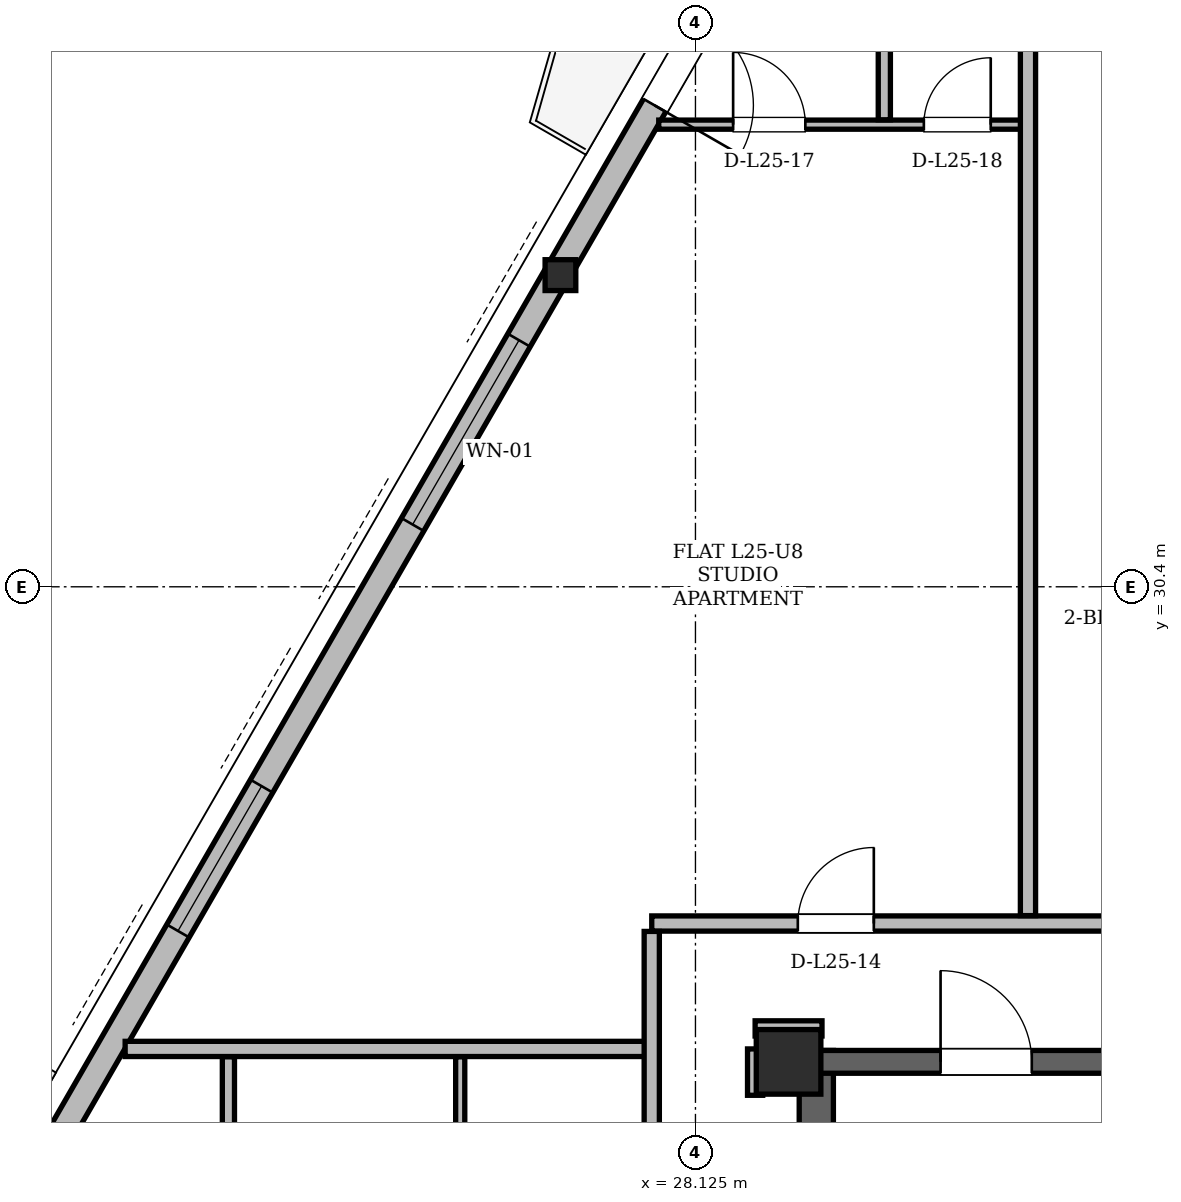
"""IFC4 building model, lengths in metres.
Left out: names, types, materials, properties, quantities, classifications, styles, units other than length and angle.
Written with IfcOpenShell. Run it as: python <this file> out.ifc"""

import sys

from ifc_helpers import new_model, si_unit, direction, frame, frame_2d, origin, origin_2d, place, context, subcontext, project, spatial, rectangle, hollow_rectangle, i_section, extrude, element, fill, save


model = new_model("IFC4")
c1 = context("Model", 3, precision=1e-05, world=origin(), true_north=direction((0.0, 1.0)))
c2 = subcontext(c1, "Body", "Model", "MODEL_VIEW")
j1 = project(units=[si_unit("LENGTHUNIT", "METRE"), si_unit("PLANEANGLEUNIT", "RADIAN")], contexts=[c1])
p1 = place(None, origin())
s1 = spatial("IfcSite", under=j1, at=p1, CompositionType="ELEMENT")
p2 = place(p1, origin())
s2 = spatial("IfcBuilding", under=s1, at=p2, CompositionType="ELEMENT")
p3 = place(p2, frame((0.0, 0.0, 96.9)))
s3 = spatial("IfcBuildingStorey", under=s2, at=p3, CompositionType="ELEMENT", Elevation=96.9)
p4 = place(p3, frame((29.35, 24.15, 0.0), z_axis=(0.0, 0.0, 1.0), x_axis=(1.0, 0.0, 0.0)))
e1 = element("IfcColumn", 1, at=p4, inside=s3, PredefinedType="COLUMN", context=c2, shape_type="SweptSolid", body=[
    extrude(hollow_rectangle(XDim=0.85, YDim=0.85, WallThickness=0.07, at=origin_2d()), origin(), (0.0, 0.0, 1.0), 3.6),
])
p5 = place(p3, frame((26.307, 34.515, 0.005), z_axis=(0.023379831777, -0.008359649153, 0.999691702342), x_axis=(0.336683176567, 0.941617989748, 0.0)))
e2 = element("IfcColumn", 2, at=p5, inside=s3, PredefinedType="COLUMN", context=c2, shape_type="SweptSolid", body=[
    extrude(i_section(OverallWidth=0.404, OverallDepth=0.406, WebThickness=0.027, FlangeThickness=0.044, at=origin_2d()), origin(), (0.0, 0.0, 1.0), 3.592),
])
p6 = place(p3, frame((29.715, 11.0, 0.0), z_axis=(0.0, 0.0, 1.0), x_axis=(0.0, 1.0, 0.0)))
e3 = element("IfcWall", 3, at=p6, inside=s3, PredefinedType="SHEAR", context=c2, shape_type="SweptSolid", body=[
    extrude(rectangle(XDim=13.3, YDim=0.45, at=frame_2d((6.65, 0.0))), origin(), (0.0, 0.0, 1.0), 3.36),
])
p7 = place(p3, frame((29.65, 24.15, 0.0), z_axis=(0.0, 0.0, 1.0), x_axis=(1.0, 0.0, 0.0)))
e4 = element("IfcWall", 4, at=p7, inside=s3, PredefinedType="SHEAR", context=c2, shape_type="SweptSolid", body=[
    extrude(rectangle(XDim=15.7, YDim=0.3, at=frame_2d((7.85, 0.0))), origin(), (0.0, 0.0, 1.0), 3.36),
])
p8 = place(p7, frame((1.7, 0.0, 0.0)))
e5 = element("IfcOpeningElement", 5, at=p8, cuts=e4, PredefinedType="OPENING", context=c2, shape_type="SweptSolid", body=[
    extrude(rectangle(XDim=1.2, YDim=2.2, at=frame_2d((0.6, 1.1))), frame((0.0, 0.15, 0.0), z_axis=(0.0, -1.0, 0.0), x_axis=(1.0, 0.0, 0.0)), (0.0, 0.0, 1.0), 0.3),
])
p9 = place(p7, frame((12.8, 0.0, 0.0)))
e6 = element("IfcOpeningElement", 6, at=p9, cuts=e4, PredefinedType="OPENING", context=c2, shape_type="SweptSolid", body=[
    extrude(rectangle(XDim=1.2, YDim=2.2, at=frame_2d((0.6, 1.1))), frame((0.0, 0.15, 0.0), z_axis=(0.0, -1.0, 0.0), x_axis=(1.0, 0.0, 0.0)), (0.0, 0.0, 1.0), 0.3),
])
p10 = place(p7, frame((6.55, 0.0, 0.0)))
e7 = element("IfcOpeningElement", 7, at=p10, cuts=e4, PredefinedType="OPENING", context=c2, shape_type="SweptSolid", body=[
    extrude(rectangle(XDim=0.9, YDim=2.05, at=frame_2d((0.45, 1.025))), frame((0.0, 0.15, 0.0), z_axis=(0.0, -1.0, 0.0), x_axis=(1.0, 0.0, 0.0)), (0.0, 0.0, 1.0), 0.3),
])
p11 = place(p7, frame((8.45, 0.0, 0.0)))
e8 = element("IfcOpeningElement", 8, at=p11, cuts=e4, PredefinedType="OPENING", context=c2, shape_type="SweptSolid", body=[
    extrude(rectangle(XDim=0.9, YDim=2.05, at=frame_2d((0.45, 1.025))), frame((0.0, 0.15, 0.0), z_axis=(0.0, -1.0, 0.0), x_axis=(1.0, 0.0, 0.0)), (0.0, 0.0, 1.0), 0.3),
])
p12 = place(p3, frame((31.472, 43.462, 0.0), z_axis=(0.0, 0.0, 1.0), x_axis=(-0.499995749028, -0.86602785807, 0.0)))
e9 = element("IfcWall", 9, at=p12, inside=s3, PredefinedType="SOLIDWALL", context=c2, shape_type="SweptSolid", body=[
    extrude(rectangle(XDim=34.437, YDim=0.34, at=frame_2d((17.218, 0.0))), origin(), (0.0, 0.0, 1.0), 2.578),
])
p13 = place(p12, frame((6.469, 0.0, 0.0)))
e10 = element("IfcOpeningElement", 10, at=p13, cuts=e9, PredefinedType="OPENING", context=c2, shape_type="SweptSolid", body=[
    extrude(rectangle(XDim=1.3, YDim=2.2, at=frame_2d((0.65, 1.1))), frame((0.0, 0.17, 0.0), z_axis=(0.0, -1.0, 0.0), x_axis=(1.0, 0.0, 0.0)), (0.0, 0.0, 1.0), 0.34),
])
p14 = place(p12, frame((24.902, 0.0, 0.0)))
e11 = element("IfcOpeningElement", 11, at=p14, cuts=e9, PredefinedType="OPENING", context=c2, shape_type="SweptSolid", body=[
    extrude(rectangle(XDim=1.5, YDim=2.2, at=frame_2d((0.75, 1.1))), frame((0.0, 0.17, 0.0), z_axis=(0.0, -1.0, 0.0), x_axis=(1.0, 0.0, 0.0)), (0.0, 0.0, 1.0), 0.34),
])
p15 = place(p12, frame((30.75, 0.0, 0.85)))
e12 = element("IfcOpeningElement", 12, at=p15, cuts=e9, PredefinedType="OPENING", context=c2, shape_type="SweptSolid", body=[
    extrude(rectangle(XDim=1.4, YDim=1.6, at=frame_2d((0.7, 0.8))), frame((0.0, 0.17, 0.0), z_axis=(0.0, -1.0, 0.0), x_axis=(1.0, 0.0, 0.0)), (0.0, 0.0, 1.0), 0.34),
])
p16 = place(p12, frame((11.337, 0.0, 0.85)))
e13 = element("IfcOpeningElement", 13, at=p16, cuts=e9, PredefinedType="OPENING", context=c2, shape_type="SweptSolid", body=[
    extrude(rectangle(XDim=2.8, YDim=1.618, at=frame_2d((1.4, 0.809))), frame((0.0, 0.17, 0.0), z_axis=(0.0, -1.0, 0.0), x_axis=(1.0, 0.0, 0.0)), (0.0, 0.0, 1.0), 0.34),
])
p17 = place(p12, frame((18.111, 0.0, 0.85)))
e14 = element("IfcOpeningElement", 14, at=p17, cuts=e9, PredefinedType="OPENING", context=c2, shape_type="SweptSolid", body=[
    extrude(rectangle(XDim=2.2, YDim=1.618, at=frame_2d((1.1, 0.809))), frame((0.0, 0.17, 0.0), z_axis=(0.0, -1.0, 0.0), x_axis=(1.0, 0.0, 0.0)), (0.0, 0.0, 1.0), 0.34),
])
p18 = place(p12, frame((3.044, 0.0, 0.85)))
e15 = element("IfcOpeningElement", 15, at=p18, cuts=e9, PredefinedType="OPENING", context=c2, shape_type="SweptSolid", body=[
    extrude(rectangle(XDim=1.2, YDim=1.48, at=frame_2d((0.6, 0.74))), frame((0.0, 0.17, 0.0), z_axis=(0.0, -1.0, 0.0), x_axis=(1.0, 0.0, 0.0)), (0.0, 0.0, 1.0), 0.34),
])
p19 = place(p3, frame((20.621, 24.32, 0.0), z_axis=(0.0, 0.0, 1.0), x_axis=(1.0, 0.0, 0.0)))
e16 = element("IfcWall", 16, at=p19, inside=s3, PredefinedType="PARTITIONING", context=c2, shape_type="SweptSolid", body=[
    extrude(rectangle(XDim=6.929, YDim=0.2, at=frame_2d((3.464, 0.0))), origin(), (0.0, 0.0, 1.0), 3.36),
])
p20 = place(p3, frame((28.91, 24.59, 0.0), z_axis=(0.0, 0.0, 1.0), x_axis=(1.0, 0.0, 0.0)))
e17 = element("IfcWall", 17, at=p20, inside=s3, PredefinedType="PARTITIONING", context=c2, shape_type="SweptSolid", body=[
    extrude(rectangle(XDim=0.88, YDim=0.2, at=frame_2d((0.44, 0.0))), origin(), (0.0, 0.0, 1.0), 2.814),
])
p21 = place(p3, frame((27.55, 25.97, 0.0), z_axis=(0.0, 0.0, 1.0), x_axis=(1.0, 0.0, 0.0)))
e18 = element("IfcWall", 18, at=p21, inside=s3, PredefinedType="PARTITIONING", context=c2, shape_type="SweptSolid", body=[
    extrude(rectangle(XDim=19.9, YDim=0.2, at=frame_2d((9.95, 0.0))), origin(), (0.0, 0.0, 1.0), 2.814),
])
p22 = place(p21, frame((1.922, 0.0, 0.0)))
e19 = element("IfcOpeningElement", 19, at=p22, cuts=e18, PredefinedType="OPENING", context=c2, shape_type="SweptSolid", body=[
    extrude(rectangle(XDim=1.0, YDim=2.18, at=frame_2d((0.5, 1.09))), frame((0.0, 0.1, 0.0), z_axis=(0.0, -1.0, 0.0), x_axis=(1.0, 0.0, 0.0)), (0.0, 0.0, 1.0), 0.2),
])
p23 = place(p21, frame((7.977, 0.0, 0.0)))
e20 = element("IfcOpeningElement", 20, at=p23, cuts=e18, PredefinedType="OPENING", context=c2, shape_type="SweptSolid", body=[
    extrude(rectangle(XDim=1.0, YDim=2.18, at=frame_2d((0.5, 1.09))), frame((0.0, 0.1, 0.0), z_axis=(0.0, -1.0, 0.0), x_axis=(1.0, 0.0, 0.0)), (0.0, 0.0, 1.0), 0.2),
])
p24 = place(p21, frame((16.83, 0.0, 0.0)))
e21 = element("IfcOpeningElement", 21, at=p24, cuts=e18, PredefinedType="OPENING", context=c2, shape_type="SweptSolid", body=[
    extrude(rectangle(XDim=1.0, YDim=2.18, at=frame_2d((0.5, 1.09))), frame((0.0, 0.1, 0.0), z_axis=(0.0, -1.0, 0.0), x_axis=(1.0, 0.0, 0.0)), (0.0, 0.0, 1.0), 0.2),
])
p25 = place(p3, frame((27.642, 36.48, 0.0), z_axis=(0.0, 0.0, 1.0), x_axis=(1.0, 0.0, 0.0)))
e22 = element("IfcWall", 22, at=p25, inside=s3, PredefinedType="PARTITIONING", context=c2, shape_type="SweptSolid", body=[
    extrude(rectangle(XDim=4.908, YDim=0.12, at=frame_2d((2.454, 0.0))), origin(), (0.0, 0.0, 1.0), 2.814),
])
p26 = place(p25, frame((0.979, 0.0, 0.0)))
e23 = element("IfcOpeningElement", 23, at=p26, cuts=e22, PredefinedType="OPENING", context=c2, shape_type="SweptSolid", body=[
    extrude(rectangle(XDim=0.95, YDim=2.1, at=frame_2d((0.475, 1.05))), frame((0.0, 0.06, 0.0), z_axis=(0.0, -1.0, 0.0), x_axis=(1.0, 0.0, 0.0)), (0.0, 0.0, 1.0), 0.12),
])
p27 = place(p25, frame((3.488, 0.0, 0.0)))
e24 = element("IfcOpeningElement", 24, at=p27, cuts=e22, PredefinedType="OPENING", context=c2, shape_type="SweptSolid", body=[
    extrude(rectangle(XDim=0.88, YDim=2.08, at=frame_2d((0.44, 1.04))), frame((0.0, 0.06, 0.0), z_axis=(0.0, -1.0, 0.0), x_axis=(1.0, 0.0, 0.0)), (0.0, 0.0, 1.0), 0.12),
])
p28 = place(p3, frame((21.98, 21.754, 0.0), z_axis=(0.0, 0.0, 1.0), x_axis=(0.0, 1.0, 0.0)))
e25 = element("IfcWall", 25, at=p28, inside=s3, PredefinedType="PARTITIONING", context=c2, shape_type="SweptSolid", body=[
    extrude(rectangle(XDim=2.462, YDim=0.16, at=frame_2d((1.231, 0.0))), origin(), (0.0, 0.0, 1.0), 3.36),
])
p29 = place(p3, frame((25.03, 21.754, 0.0), z_axis=(0.0, 0.0, 1.0), x_axis=(0.0, 1.0, 0.0)))
e26 = element("IfcWall", 26, at=p29, inside=s3, PredefinedType="PARTITIONING", context=c2, shape_type="SweptSolid", body=[
    extrude(rectangle(XDim=2.462, YDim=0.12, at=frame_2d((1.231, 0.0))), origin(), (0.0, 0.0, 1.0), 3.36),
])
p30 = place(p3, frame((27.55, 11.054, 0.0), z_axis=(0.0, 0.0, 1.0), x_axis=(0.0, 1.0, 0.0)))
e27 = element("IfcWall", 27, at=p30, inside=s3, PredefinedType="PARTITIONING", context=c2, shape_type="SweptSolid", body=[
    extrude(rectangle(XDim=14.812, YDim=0.2, at=frame_2d((7.406, 0.0))), origin(), (0.0, 0.0, 1.0), 2.814),
])
p31 = place(p30, frame((3.825, 0.0, 0.0)))
e28 = element("IfcOpeningElement", 28, at=p31, cuts=e27, PredefinedType="OPENING", context=c2, shape_type="SweptSolid", body=[
    extrude(rectangle(XDim=1.0, YDim=2.18, at=frame_2d((0.5, 1.09))), frame((0.0, 0.1, 0.0), z_axis=(0.0, -1.0, 0.0), x_axis=(1.0, 0.0, 0.0)), (0.0, 0.0, 1.0), 0.2),
])
p32 = place(p30, frame((7.788, 0.0, 0.0)))
e29 = element("IfcOpeningElement", 29, at=p32, cuts=e27, PredefinedType="OPENING", context=c2, shape_type="SweptSolid", body=[
    extrude(rectangle(XDim=1.0, YDim=2.18, at=frame_2d((0.5, 1.09))), frame((0.0, 0.1, 0.0), z_axis=(0.0, -1.0, 0.0), x_axis=(1.0, 0.0, 0.0)), (0.0, 0.0, 1.0), 0.2),
])
p33 = place(p3, frame((28.91, 23.71, 0.0), z_axis=(0.0, 0.0, 1.0), x_axis=(0.0, 1.0, 0.0)))
e30 = element("IfcWall", 30, at=p33, inside=s3, PredefinedType="PARTITIONING", context=c2, shape_type="SweptSolid", body=[
    extrude(rectangle(XDim=0.61, YDim=0.2, at=frame_2d((0.305, 0.0))), origin(), (0.0, 0.0, 1.0), 3.36),
])
p34 = place(p3, frame((30.61, 36.544, 0.0), z_axis=(0.0, 0.0, 1.0), x_axis=(0.0, 1.0, 0.0)))
e31 = element("IfcWall", 31, at=p34, inside=s3, PredefinedType="PARTITIONING", context=c2, shape_type="SweptSolid", body=[
    extrude(rectangle(XDim=5.077, YDim=0.16, at=frame_2d((2.539, 0.0))), origin(), (0.0, 0.0, 1.0), 2.578),
])
p35 = place(p3, frame((32.5, 26.074, 0.0), z_axis=(0.0, 0.0, 1.0), x_axis=(0.0, 1.0, 0.0)))
e32 = element("IfcWall", 32, at=p35, inside=s3, PredefinedType="PARTITIONING", context=c2, shape_type="SweptSolid", body=[
    extrude(rectangle(XDim=17.214, YDim=0.2, at=frame_2d((8.607, 0.0))), origin(), (0.0, 0.0, 1.0), 3.36),
])
p36 = place(p13, origin())
e33 = element("IfcDoor", 33, at=p36, inside=s3, OperationType="SINGLE_SWING_RIGHT", PredefinedType="DOOR", context=c2, shape_type="SweptSolid", body=[
    extrude(rectangle(XDim=1.3, YDim=2.2, at=frame_2d((0.65, 1.1))), frame((0.0, 0.025, 0.0), z_axis=(0.0, -1.0, 0.0), x_axis=(1.0, 0.0, 0.0)), (0.0, 0.0, 1.0), 0.05),
])
fill(e10, e33)
p37 = place(p16, origin())
e34 = element("IfcWindow", 34, at=p37, inside=s3, PartitioningType="SINGLE_PANEL", PredefinedType="WINDOW", context=c2, shape_type="SweptSolid", body=[
    extrude(rectangle(XDim=2.8, YDim=1.618, at=frame_2d((1.4, 0.809))), frame((0.0, 0.03, 0.0), z_axis=(0.0, -1.0, 0.0), x_axis=(1.0, 0.0, 0.0)), (0.0, 0.0, 1.0), 0.06),
])
fill(e13, e34)
p38 = place(p17, origin())
e35 = element("IfcWindow", 35, at=p38, inside=s3, PartitioningType="SINGLE_PANEL", PredefinedType="WINDOW", context=c2, shape_type="SweptSolid", body=[
    extrude(rectangle(XDim=2.2, YDim=1.618, at=frame_2d((1.1, 0.809))), frame((0.0, 0.03, 0.0), z_axis=(0.0, -1.0, 0.0), x_axis=(1.0, 0.0, 0.0)), (0.0, 0.0, 1.0), 0.06),
])
fill(e14, e35)
p39 = place(p8, origin())
e36 = element("IfcDoor", 36, at=p39, inside=s3, OperationType="SINGLE_SWING_LEFT", PredefinedType="DOOR", context=c2, shape_type="SweptSolid", body=[
    extrude(rectangle(XDim=1.2, YDim=2.2, at=frame_2d((0.6, 1.1))), frame((0.0, 0.025, 0.0), z_axis=(0.0, -1.0, 0.0), x_axis=(1.0, 0.0, 0.0)), (0.0, 0.0, 1.0), 0.05),
])
fill(e5, e36)
p40 = place(p22, origin())
e37 = element("IfcDoor", 37, at=p40, inside=s3, OperationType="SINGLE_SWING_RIGHT", PredefinedType="DOOR", context=c2, shape_type="SweptSolid", body=[
    extrude(rectangle(XDim=1.0, YDim=2.18, at=frame_2d((0.5, 1.09))), frame((0.0, 0.025, 0.0), z_axis=(0.0, -1.0, 0.0), x_axis=(1.0, 0.0, 0.0)), (0.0, 0.0, 1.0), 0.05),
])
fill(e19, e37)
p41 = place(p26, origin())
e38 = element("IfcDoor", 38, at=p41, inside=s3, OperationType="SINGLE_SWING_LEFT", PredefinedType="DOOR", context=c2, shape_type="SweptSolid", body=[
    extrude(rectangle(XDim=0.95, YDim=2.1, at=frame_2d((0.475, 1.05))), frame((0.0, 0.025, 0.0), z_axis=(0.0, -1.0, 0.0), x_axis=(1.0, 0.0, 0.0)), (0.0, 0.0, 1.0), 0.05),
])
fill(e23, e38)
p42 = place(p27, origin())
e39 = element("IfcDoor", 39, at=p42, inside=s3, OperationType="SINGLE_SWING_RIGHT", PredefinedType="DOOR", context=c2, shape_type="SweptSolid", body=[
    extrude(rectangle(XDim=0.88, YDim=2.08, at=frame_2d((0.44, 1.04))), frame((0.0, 0.025, 0.0), z_axis=(0.0, -1.0, 0.0), x_axis=(1.0, 0.0, 0.0)), (0.0, 0.0, 1.0), 0.05),
])
fill(e24, e39)
save(model, sys.argv[1])
